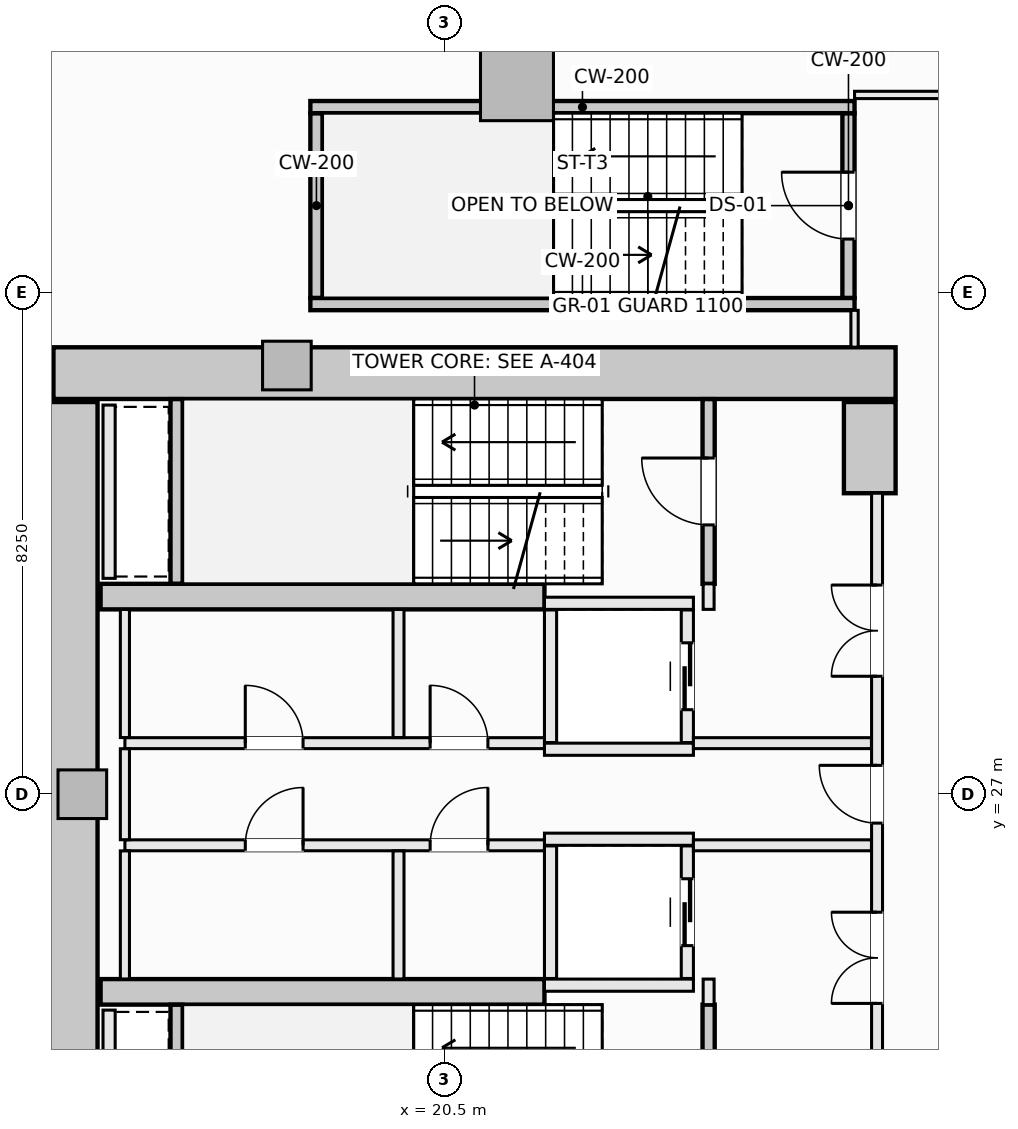
"""IFC4 building model, lengths in metres.
Left out: names, types, materials, properties, quantities, classifications, styles, units other than length and angle.
Written with IfcOpenShell. Run it as: python <this file> out.ifc"""

import sys

from ifc_helpers import new_model, si_unit, direction, frame, frame_2d, origin, origin_2d, place, context, subcontext, project, spatial, rectangle, extrude, element, fill, save


model = new_model("IFC4")
c1 = context("Model", 3, precision=1e-05, world=origin(), true_north=direction((0.0, 1.0)))
c2 = subcontext(c1, "Body", "Model", "MODEL_VIEW")
j1 = project(units=[si_unit("LENGTHUNIT", "METRE"), si_unit("PLANEANGLEUNIT", "RADIAN")], contexts=[c1])
p1 = place(None, origin())
s1 = spatial("IfcSite", under=j1, at=p1, CompositionType="ELEMENT")
p2 = place(p1, origin())
s2 = spatial("IfcBuilding", under=s1, at=p2, CompositionType="ELEMENT")
p3 = place(p2, frame((0.0, 0.0, 45.75)))
s3 = spatial("IfcBuildingStorey", under=s2, at=p3, CompositionType="ELEMENT", Elevation=45.75)
p4 = place(p3, frame((14.075, 33.925, -0.28), z_axis=(0.0, 0.0, 1.0), x_axis=(1.0, 0.0, 0.0)))
e1 = element("IfcWall", 1, at=p4, inside=s3, PredefinedType="SHEAR", context=c2, shape_type="SweptSolid", body=[
    extrude(rectangle(XDim=13.85, YDim=0.85, at=frame_2d((6.925, 0.0))), origin(), (0.0, 0.0, 1.0), 3.85),
])
p5 = place(p3, frame((14.375, 20.55, -0.28), z_axis=(0.0, 0.0, 1.0), x_axis=(0.0, 1.0, 0.0)))
e2 = element("IfcWall", 2, at=p5, inside=s3, PredefinedType="SHEAR", context=c2, shape_type="SweptSolid", body=[
    extrude(rectangle(XDim=12.9, YDim=0.85, at=frame_2d((6.45, 0.0))), origin(), (0.0, 0.0, 1.0), 3.85),
])
p6 = place(p3, frame((27.5, 31.95, -0.28), z_axis=(0.0, 0.0, 1.0), x_axis=(0.0, 1.0, 0.0)))
e3 = element("IfcWall", 3, at=p6, inside=s3, PredefinedType="SHEAR", context=c2, shape_type="SweptSolid", body=[
    extrude(rectangle(XDim=1.5, YDim=0.85, at=frame_2d((0.75, 0.0))), origin(), (0.0, 0.0, 1.0), 3.85),
])
for number, where, z_axis, x_axis in (
    (4, (14.85, 30.25, -0.28), (0.0, 0.0, 1.0), (1.0, 0.0, 0.0)),
    (5, (14.85, 23.75, -0.28), (0.0, 0.0, 1.0), (1.0, 0.0, 0.0)),
):
    element("IfcWall", number, at=place(p3, frame(where, z_axis=z_axis, x_axis=x_axis)), inside=s3, PredefinedType="SHEAR", context=c2, shape_type="SweptSolid", body=[
        extrude(rectangle(XDim=7.3, YDim=0.42, at=frame_2d((3.65, 0.0))), origin(), (0.0, 0.0, 1.0), 3.85),
    ])
p7 = place(p3, frame((21.698, 38.677, -0.28), z_axis=(0.0, 0.0, 1.0), x_axis=(1.0, 0.0, 0.0)))
e6 = element("IfcColumn", 6, at=p7, inside=s3, PredefinedType="COLUMN", context=c2, shape_type="SweptSolid", body=[
    extrude(rectangle(XDim=1.2, YDim=1.2, at=origin_2d()), origin(), (0.0, 0.0, 1.0), 3.85),
])
for number, where, z_axis, x_axis in (
    (7, (17.914, 34.05, -0.28), (0.0, 0.0, 1.0), (1.0, 0.0, 0.0)),
    (8, (14.55, 27.0, -0.28), (0.0, 0.0, 1.0), (1.0, 0.0, 0.0)),
):
    element("IfcColumn", number, at=place(p3, frame(where, z_axis=z_axis, x_axis=x_axis)), inside=s3, PredefinedType="PILASTER", context=c2, shape_type="SweptSolid", body=[
        extrude(rectangle(XDim=0.8, YDim=0.8, at=origin_2d()), origin(), (0.0, 0.0, 1.0), 3.85),
    ])
p8 = place(p3, frame((24.85, 30.46, -0.28), z_axis=(0.0, 0.0, 1.0), x_axis=(0.0, 1.0, 0.0)))
e9 = element("IfcWall", 9, at=p8, inside=s3, PredefinedType="SHEAR", context=c2, shape_type="SweptSolid", body=[
    extrude(rectangle(XDim=3.038, YDim=0.2, at=frame_2d((1.519, 0.0))), origin(), (0.0, 0.0, 1.0), 3.85),
])
p9 = place(p8, frame((0.969, 0.0, 0.28)))
e10 = element("IfcOpeningElement", 10, at=p9, cuts=e9, PredefinedType="OPENING", context=c2, shape_type="SweptSolid", body=[
    extrude(rectangle(XDim=1.1, YDim=2.15, at=frame_2d((0.55, 1.075))), frame((0.0, 0.11, 0.0), z_axis=(0.0, -1.0, 0.0), x_axis=(1.0, 0.0, 0.0)), (0.0, 0.0, 1.0), 0.22),
])
p10 = place(p3, frame((16.1, 30.462, -0.28), z_axis=(0.0, 0.0, 1.0), x_axis=(0.0, 1.0, 0.0)))
e11 = element("IfcWall", 11, at=p10, inside=s3, PredefinedType="SHEAR", context=c2, shape_type="SweptSolid", body=[
    extrude(rectangle(XDim=3.036, YDim=0.2, at=frame_2d((1.518, 0.0))), origin(), (0.0, 0.0, 1.0), 3.85),
])
p11 = place(p3, frame((24.85, 20.502, -0.28), z_axis=(0.0, 0.0, 1.0), x_axis=(0.0, 1.0, 0.0)))
e12 = element("IfcWall", 12, at=p11, inside=s3, PredefinedType="SHEAR", context=c2, shape_type="SweptSolid", body=[
    extrude(rectangle(XDim=3.038, YDim=0.2, at=frame_2d((1.519, 0.0))), origin(), (0.0, 0.0, 1.0), 3.85),
])
p12 = place(p11, frame((0.969, 0.0, 0.28)))
e13 = element("IfcOpeningElement", 13, at=p12, cuts=e12, PredefinedType="OPENING", context=c2, shape_type="SweptSolid", body=[
    extrude(rectangle(XDim=1.1, YDim=2.15, at=frame_2d((0.55, 1.075))), frame((0.0, 0.11, 0.0), z_axis=(0.0, -1.0, 0.0), x_axis=(1.0, 0.0, 0.0)), (0.0, 0.0, 1.0), 0.22),
])
p13 = place(p3, frame((16.1, 20.502, -0.28), z_axis=(0.0, 0.0, 1.0), x_axis=(0.0, 1.0, 0.0)))
e14 = element("IfcWall", 14, at=p13, inside=s3, PredefinedType="SHEAR", context=c2, shape_type="SweptSolid", body=[
    extrude(rectangle(XDim=3.036, YDim=0.2, at=frame_2d((1.518, 0.0))), origin(), (0.0, 0.0, 1.0), 3.85),
])
p14 = place(p3, frame((27.15, 35.16, -0.28), z_axis=(0.0, 0.0, 1.0), x_axis=(0.0, 1.0, 0.0)))
e15 = element("IfcWall", 15, at=p14, inside=s3, PredefinedType="SHEAR", context=c2, shape_type="SweptSolid", body=[
    extrude(rectangle(XDim=3.04, YDim=0.2, at=frame_2d((1.52, 0.0))), origin(), (0.0, 0.0, 1.0), 3.85),
])
p15 = place(p14, frame((0.97, 0.0, 0.28)))
e16 = element("IfcOpeningElement", 16, at=p15, cuts=e15, PredefinedType="OPENING", context=c2, shape_type="SweptSolid", body=[
    extrude(rectangle(XDim=1.1, YDim=2.15, at=frame_2d((0.55, 1.075))), frame((0.0, 0.11, 0.0), z_axis=(0.0, -1.0, 0.0), x_axis=(1.0, 0.0, 0.0)), (0.0, 0.0, 1.0), 0.22),
])
p16 = place(p3, frame((18.4, 35.16, -0.28), z_axis=(0.0, 0.0, 1.0), x_axis=(0.0, 1.0, 0.0)))
e17 = element("IfcWall", 17, at=p16, inside=s3, PredefinedType="SHEAR", context=c2, shape_type="SweptSolid", body=[
    extrude(rectangle(XDim=3.04, YDim=0.2, at=frame_2d((1.52, 0.0))), origin(), (0.0, 0.0, 1.0), 3.85),
])
for number, where, z_axis, x_axis in (
    (18, (18.3, 38.3, -0.28), (0.0, 0.0, 1.0), (1.0, 0.0, 0.0)),
    (19, (18.3, 35.06, -0.28), (0.0, 0.0, 1.0), (1.0, 0.0, 0.0)),
):
    element("IfcWall", number, at=place(p3, frame(where, z_axis=z_axis, x_axis=x_axis)), inside=s3, PredefinedType="SHEAR", context=c2, shape_type="SweptSolid", body=[
        extrude(rectangle(XDim=8.95, YDim=0.2, at=frame_2d((4.475, 0.0))), origin(), (0.0, 0.0, 1.0), 3.85),
    ])
for number, where, z_axis, x_axis in (
    (20, (22.15, 30.14, 0.0), (0.0, 0.0, 1.0), (1.0, 0.0, 0.0)),
    (21, (22.15, 27.74, 0.0), (0.0, 0.0, 1.0), (1.0, 0.0, 0.0)),
):
    element("IfcWall", number, at=place(p3, frame(where, z_axis=z_axis, x_axis=x_axis)), inside=s3, PredefinedType="SOLIDWALL", context=c2, shape_type="SweptSolid", body=[
        extrude(rectangle(XDim=2.45, YDim=0.2, at=frame_2d((1.225, 0.0))), origin(), (0.0, 0.0, 1.0), 3.57),
    ])
p17 = place(p3, frame((22.25, 27.85, 0.0), z_axis=(0.0, 0.0, 1.0), x_axis=(0.0, 1.0, 0.0)))
e22 = element("IfcWall", 22, at=p17, inside=s3, PredefinedType="SOLIDWALL", context=c2, shape_type="SweptSolid", body=[
    extrude(rectangle(XDim=2.18, YDim=0.2, at=frame_2d((1.09, 0.0))), origin(), (0.0, 0.0, 1.0), 3.57),
])
p18 = place(p3, frame((24.5, 27.85, 0.0), z_axis=(0.0, 0.0, 1.0), x_axis=(0.0, 1.0, 0.0)))
e23 = element("IfcWall", 23, at=p18, inside=s3, PredefinedType="SOLIDWALL", context=c2, shape_type="SweptSolid", body=[
    extrude(rectangle(XDim=2.18, YDim=0.2, at=frame_2d((1.09, 0.0))), origin(), (0.0, 0.0, 1.0), 3.57),
])
p19 = place(p18, frame((0.54, 0.0, 0.0)))
e24 = element("IfcOpeningElement", 24, at=p19, cuts=e23, PredefinedType="OPENING", context=c2, shape_type="SweptSolid", body=[
    extrude(rectangle(XDim=1.1, YDim=2.2, at=frame_2d((0.55, 1.1))), frame((0.0, 0.11, 0.0), z_axis=(0.0, -1.0, 0.0), x_axis=(1.0, 0.0, 0.0)), (0.0, 0.0, 1.0), 0.22),
])
for number, where, z_axis, x_axis in (
    (25, (22.15, 26.26, 0.0), (0.0, 0.0, 1.0), (1.0, 0.0, 0.0)),
    (26, (22.15, 23.86, 0.0), (0.0, 0.0, 1.0), (1.0, 0.0, 0.0)),
):
    element("IfcWall", number, at=place(p3, frame(where, z_axis=z_axis, x_axis=x_axis)), inside=s3, PredefinedType="SOLIDWALL", context=c2, shape_type="SweptSolid", body=[
        extrude(rectangle(XDim=2.45, YDim=0.2, at=frame_2d((1.225, 0.0))), origin(), (0.0, 0.0, 1.0), 3.57),
    ])
p20 = place(p3, frame((22.25, 23.97, 0.0), z_axis=(0.0, 0.0, 1.0), x_axis=(0.0, 1.0, 0.0)))
e27 = element("IfcWall", 27, at=p20, inside=s3, PredefinedType="SOLIDWALL", context=c2, shape_type="SweptSolid", body=[
    extrude(rectangle(XDim=2.18, YDim=0.2, at=frame_2d((1.09, 0.0))), origin(), (0.0, 0.0, 1.0), 3.57),
])
p21 = place(p3, frame((24.5, 23.97, 0.0), z_axis=(0.0, 0.0, 1.0), x_axis=(0.0, 1.0, 0.0)))
e28 = element("IfcWall", 28, at=p21, inside=s3, PredefinedType="SOLIDWALL", context=c2, shape_type="SweptSolid", body=[
    extrude(rectangle(XDim=2.18, YDim=0.2, at=frame_2d((1.09, 0.0))), origin(), (0.0, 0.0, 1.0), 3.57),
])
p22 = place(p21, frame((0.54, 0.0, 0.0)))
e29 = element("IfcOpeningElement", 29, at=p22, cuts=e28, PredefinedType="OPENING", context=c2, shape_type="SweptSolid", body=[
    extrude(rectangle(XDim=1.1, YDim=2.2, at=frame_2d((0.55, 1.1))), frame((0.0, 0.11, 0.0), z_axis=(0.0, -1.0, 0.0), x_axis=(1.0, 0.0, 0.0)), (0.0, 0.0, 1.0), 0.22),
])
for number, where, z_axis, x_axis in (
    (30, (14.99, 30.55, 0.0), (0.0, 0.0, 1.0), (0.0, 1.0, 0.0)),
    (31, (14.99, 20.6, 0.0), (0.0, 0.0, 1.0), (0.0, 1.0, 0.0)),
):
    element("IfcWall", number, at=place(p3, frame(where, z_axis=z_axis, x_axis=x_axis)), inside=s3, PredefinedType="SOLIDWALL", context=c2, shape_type="SweptSolid", body=[
        extrude(rectangle(XDim=2.85, YDim=0.2, at=frame_2d((1.425, 0.0))), origin(), (0.0, 0.0, 1.0), 3.57),
    ])
for number, where, z_axis, x_axis in (
    (32, (24.85, 23.54, 0.0), (0.0, 0.0, 1.0), (0.0, 1.0, 0.0)),
    (33, (24.85, 30.04, 0.0), (0.0, 0.0, 1.0), (0.0, 1.0, 0.0)),
):
    element("IfcWall", number, at=place(p3, frame(where, z_axis=z_axis, x_axis=x_axis)), inside=s3, PredefinedType="SOLIDWALL", context=c2, shape_type="SweptSolid", body=[
        extrude(rectangle(XDim=0.42, YDim=0.18, at=frame_2d((0.21, 0.0))), origin(), (0.0, 0.0, 1.0), 3.57),
    ])
p23 = place(p3, frame((27.62, 22.05, 0.0), z_axis=(0.0, 0.0, 1.0), x_axis=(0.0, 1.0, 0.0)))
e34 = element("IfcWall", 34, at=p23, inside=s3, PredefinedType="SOLIDWALL", context=c2, shape_type="SweptSolid", body=[
    extrude(rectangle(XDim=9.9, YDim=0.18, at=frame_2d((4.95, 0.0))), origin(), (0.0, 0.0, 1.0), 2.662),
])
p24 = place(p23, frame((4.475, 0.0, 0.0)))
e35 = element("IfcOpeningElement", 35, at=p24, cuts=e34, PredefinedType="OPENING", context=c2, shape_type="SweptSolid", body=[
    extrude(rectangle(XDim=0.95, YDim=2.1, at=frame_2d((0.475, 1.05))), frame((0.0, 0.1, 0.0), z_axis=(0.0, -1.0, 0.0), x_axis=(1.0, 0.0, 0.0)), (0.0, 0.0, 1.0), 0.2),
])
p25 = place(p23, frame((6.89, 0.0, 0.0)))
e36 = element("IfcOpeningElement", 36, at=p25, cuts=e34, PredefinedType="OPENING", context=c2, shape_type="SweptSolid", body=[
    extrude(rectangle(XDim=1.5, YDim=2.2, at=frame_2d((0.75, 1.1))), frame((0.0, 0.1, 0.0), z_axis=(0.0, -1.0, 0.0), x_axis=(1.0, 0.0, 0.0)), (0.0, 0.0, 1.0), 0.2),
])
p26 = place(p23, frame((1.51, 0.0, 0.0)))
e37 = element("IfcOpeningElement", 37, at=p26, cuts=e34, PredefinedType="OPENING", context=c2, shape_type="SweptSolid", body=[
    extrude(rectangle(XDim=1.5, YDim=2.2, at=frame_2d((0.75, 1.1))), frame((0.0, 0.1, 0.0), z_axis=(0.0, -1.0, 0.0), x_axis=(1.0, 0.0, 0.0)), (0.0, 0.0, 1.0), 0.2),
])
p27 = place(p3, frame((15.25, 27.84, 0.0), z_axis=(0.0, 0.0, 1.0), x_axis=(1.0, 0.0, 0.0)))
e38 = element("IfcWall", 38, at=p27, inside=s3, PredefinedType="SOLIDWALL", context=c2, shape_type="SweptSolid", body=[
    extrude(rectangle(XDim=6.9, YDim=0.18, at=frame_2d((3.45, 0.0))), origin(), (0.0, 0.0, 1.0), 3.57),
])
p28 = place(p27, frame((5.02, 0.0, 0.0)))
e39 = element("IfcOpeningElement", 39, at=p28, cuts=e38, PredefinedType="OPENING", context=c2, shape_type="SweptSolid", body=[
    extrude(rectangle(XDim=0.95, YDim=2.1, at=frame_2d((0.475, 1.05))), frame((0.0, 0.1, 0.0), z_axis=(0.0, -1.0, 0.0), x_axis=(1.0, 0.0, 0.0)), (0.0, 0.0, 1.0), 0.2),
])
p29 = place(p27, frame((1.98, 0.0, 0.0)))
e40 = element("IfcOpeningElement", 40, at=p29, cuts=e38, PredefinedType="OPENING", context=c2, shape_type="SweptSolid", body=[
    extrude(rectangle(XDim=0.95, YDim=2.1, at=frame_2d((0.475, 1.05))), frame((0.0, 0.1, 0.0), z_axis=(0.0, -1.0, 0.0), x_axis=(1.0, 0.0, 0.0)), (0.0, 0.0, 1.0), 0.2),
])
p30 = place(p3, frame((24.6, 27.84, 0.0), z_axis=(0.0, 0.0, 1.0), x_axis=(1.0, 0.0, 0.0)))
e41 = element("IfcWall", 41, at=p30, inside=s3, PredefinedType="SOLIDWALL", context=c2, shape_type="SweptSolid", body=[
    extrude(rectangle(XDim=2.928, YDim=0.18, at=frame_2d((1.464, 0.0))), origin(), (0.0, 0.0, 1.0), 3.57),
])
p31 = place(p3, frame((15.25, 26.16, 0.0), z_axis=(0.0, 0.0, 1.0), x_axis=(1.0, 0.0, 0.0)))
e42 = element("IfcWall", 42, at=p31, inside=s3, PredefinedType="SOLIDWALL", context=c2, shape_type="SweptSolid", body=[
    extrude(rectangle(XDim=6.9, YDim=0.18, at=frame_2d((3.45, 0.0))), origin(), (0.0, 0.0, 1.0), 3.57),
])
p32 = place(p31, frame((5.02, 0.0, 0.0)))
e43 = element("IfcOpeningElement", 43, at=p32, cuts=e42, PredefinedType="OPENING", context=c2, shape_type="SweptSolid", body=[
    extrude(rectangle(XDim=0.95, YDim=2.1, at=frame_2d((0.475, 1.05))), frame((0.0, 0.1, 0.0), z_axis=(0.0, -1.0, 0.0), x_axis=(1.0, 0.0, 0.0)), (0.0, 0.0, 1.0), 0.2),
])
p33 = place(p31, frame((1.98, 0.0, 0.0)))
e44 = element("IfcOpeningElement", 44, at=p33, cuts=e42, PredefinedType="OPENING", context=c2, shape_type="SweptSolid", body=[
    extrude(rectangle(XDim=0.95, YDim=2.1, at=frame_2d((0.475, 1.05))), frame((0.0, 0.1, 0.0), z_axis=(0.0, -1.0, 0.0), x_axis=(1.0, 0.0, 0.0)), (0.0, 0.0, 1.0), 0.2),
])
p34 = place(p3, frame((24.6, 26.16, 0.0), z_axis=(0.0, 0.0, 1.0), x_axis=(1.0, 0.0, 0.0)))
e45 = element("IfcWall", 45, at=p34, inside=s3, PredefinedType="SOLIDWALL", context=c2, shape_type="SweptSolid", body=[
    extrude(rectangle(XDim=2.928, YDim=0.18, at=frame_2d((1.464, 0.0))), origin(), (0.0, 0.0, 1.0), 3.57),
])
p35 = place(p3, frame((15.25, 23.962, 0.0), z_axis=(0.0, 0.0, 1.0), x_axis=(0.0, 1.0, 0.0)))
e46 = element("IfcWall", 46, at=p35, inside=s3, PredefinedType="PARTITIONING", context=c2, shape_type="SweptSolid", body=[
    extrude(rectangle(XDim=2.106, YDim=0.15, at=frame_2d((1.053, 0.0))), origin(), (0.0, 0.0, 1.0), 3.57),
])
p36 = place(p3, frame((15.25, 26.252, 0.0), z_axis=(0.0, 0.0, 1.0), x_axis=(0.0, 1.0, 0.0)))
e47 = element("IfcWall", 47, at=p36, inside=s3, PredefinedType="PARTITIONING", context=c2, shape_type="SweptSolid", body=[
    extrude(rectangle(XDim=1.496, YDim=0.15, at=frame_2d((0.748, 0.0))), origin(), (0.0, 0.0, 1.0), 3.57),
])
p37 = place(p3, frame((15.25, 27.932, 0.0), z_axis=(0.0, 0.0, 1.0), x_axis=(0.0, 1.0, 0.0)))
e48 = element("IfcWall", 48, at=p37, inside=s3, PredefinedType="PARTITIONING", context=c2, shape_type="SweptSolid", body=[
    extrude(rectangle(XDim=2.106, YDim=0.15, at=frame_2d((1.053, 0.0))), origin(), (0.0, 0.0, 1.0), 3.57),
])
for number, where, z_axis, x_axis in (
    (49, (19.75, 23.962, 0.0), (0.0, 0.0, 1.0), (0.0, 1.0, 0.0)),
    (50, (19.75, 27.932, 0.0), (0.0, 0.0, 1.0), (0.0, 1.0, 0.0)),
):
    element("IfcWall", number, at=place(p3, frame(where, z_axis=z_axis, x_axis=x_axis)), inside=s3, PredefinedType="SOLIDWALL", context=c2, shape_type="SweptSolid", body=[
        extrude(rectangle(XDim=2.106, YDim=0.18, at=frame_2d((1.053, 0.0))), origin(), (0.0, 0.0, 1.0), 3.57),
    ])
p38 = place(p3, frame((27.25, 34.352, 0.0), z_axis=(0.0, 0.0, 1.0), x_axis=(0.0, 1.0, 0.0)))
e51 = element("IfcWall", 51, at=p38, inside=s3, PredefinedType="PARTITIONING", context=c2, shape_type="SweptSolid", body=[
    extrude(rectangle(XDim=0.606, YDim=0.12, at=frame_2d((0.303, 0.0))), origin(), (0.0, 0.0, 1.0), 3.57),
])
p39 = place(p3, frame((27.25, 38.5, 0.0), z_axis=(0.0, 0.0, 1.0), x_axis=(1.0, 0.0, 0.0)))
e52 = element("IfcWall", 52, at=p39, inside=s3, PredefinedType="PARTITIONING", context=c2, shape_type="SweptSolid", body=[
    extrude(rectangle(XDim=2.53, YDim=0.12, at=frame_2d((1.265, 0.0))), origin(), (0.0, 0.0, 1.0), 3.57),
])
p40 = place(p9, origin())
e53 = element("IfcDoor", 53, at=p40, inside=s3, OperationType="SINGLE_SWING_RIGHT", PredefinedType="DOOR", context=c2, shape_type="SweptSolid", body=[
    extrude(rectangle(XDim=1.1, YDim=2.15, at=frame_2d((0.55, 1.075))), frame((0.0, 0.025, 0.0), z_axis=(0.0, -1.0, 0.0), x_axis=(1.0, 0.0, 0.0)), (0.0, 0.0, 1.0), 0.05),
])
fill(e10, e53)
p41 = place(p15, origin())
e54 = element("IfcDoor", 54, at=p41, inside=s3, OperationType="SINGLE_SWING_RIGHT", PredefinedType="DOOR", context=c2, shape_type="SweptSolid", body=[
    extrude(rectangle(XDim=1.1, YDim=2.15, at=frame_2d((0.55, 1.075))), frame((0.0, 0.025, 0.0), z_axis=(0.0, -1.0, 0.0), x_axis=(1.0, 0.0, 0.0)), (0.0, 0.0, 1.0), 0.05),
])
fill(e16, e54)
p42 = place(p19, origin())
e55 = element("IfcDoor", 55, at=p42, inside=s3, OperationType="SLIDING_TO_LEFT", PredefinedType="DOOR", context=c2, shape_type="SweptSolid", body=[
    extrude(rectangle(XDim=1.1, YDim=2.2, at=frame_2d((0.55, 1.1))), frame((0.0, 0.025, 0.0), z_axis=(0.0, -1.0, 0.0), x_axis=(1.0, 0.0, 0.0)), (0.0, 0.0, 1.0), 0.05),
])
fill(e24, e55)
p43 = place(p22, origin())
e56 = element("IfcDoor", 56, at=p43, inside=s3, OperationType="SLIDING_TO_LEFT", PredefinedType="DOOR", context=c2, shape_type="SweptSolid", body=[
    extrude(rectangle(XDim=1.1, YDim=2.2, at=frame_2d((0.55, 1.1))), frame((0.0, 0.025, 0.0), z_axis=(0.0, -1.0, 0.0), x_axis=(1.0, 0.0, 0.0)), (0.0, 0.0, 1.0), 0.05),
])
fill(e29, e56)
p44 = place(p24, origin())
e57 = element("IfcDoor", 57, at=p44, inside=s3, OperationType="SINGLE_SWING_RIGHT", PredefinedType="DOOR", context=c2, shape_type="SweptSolid", body=[
    extrude(rectangle(XDim=0.95, YDim=2.1, at=frame_2d((0.475, 1.05))), frame((0.0, 0.025, 0.0), z_axis=(0.0, -1.0, 0.0), x_axis=(1.0, 0.0, 0.0)), (0.0, 0.0, 1.0), 0.05),
])
fill(e35, e57)
p45 = place(p25, origin())
e58 = element("IfcDoor", 58, at=p45, inside=s3, OperationType="DOUBLE_DOOR_SINGLE_SWING", PredefinedType="DOOR", context=c2, shape_type="SweptSolid", body=[
    extrude(rectangle(XDim=1.5, YDim=2.2, at=frame_2d((0.75, 1.1))), frame((0.0, 0.025, 0.0), z_axis=(0.0, -1.0, 0.0), x_axis=(1.0, 0.0, 0.0)), (0.0, 0.0, 1.0), 0.05),
])
fill(e36, e58)
p46 = place(p26, origin())
e59 = element("IfcDoor", 59, at=p46, inside=s3, OperationType="DOUBLE_DOOR_SINGLE_SWING", PredefinedType="DOOR", context=c2, shape_type="SweptSolid", body=[
    extrude(rectangle(XDim=1.5, YDim=2.2, at=frame_2d((0.75, 1.1))), frame((0.0, 0.025, 0.0), z_axis=(0.0, -1.0, 0.0), x_axis=(1.0, 0.0, 0.0)), (0.0, 0.0, 1.0), 0.05),
])
fill(e37, e59)
p47 = place(p28, origin())
e60 = element("IfcDoor", 60, at=p47, inside=s3, OperationType="SINGLE_SWING_LEFT", PredefinedType="DOOR", context=c2, shape_type="SweptSolid", body=[
    extrude(rectangle(XDim=0.95, YDim=2.1, at=frame_2d((0.475, 1.05))), frame((0.0, 0.025, 0.0), z_axis=(0.0, -1.0, 0.0), x_axis=(1.0, 0.0, 0.0)), (0.0, 0.0, 1.0), 0.05),
])
fill(e39, e60)
p48 = place(p32, origin())
e61 = element("IfcDoor", 61, at=p48, inside=s3, OperationType="SINGLE_SWING_RIGHT", PredefinedType="DOOR", context=c2, shape_type="SweptSolid", body=[
    extrude(rectangle(XDim=0.95, YDim=2.1, at=frame_2d((0.475, 1.05))), frame((0.0, 0.025, 0.0), z_axis=(0.0, -1.0, 0.0), x_axis=(1.0, 0.0, 0.0)), (0.0, 0.0, 1.0), 0.05),
])
fill(e43, e61)
p49 = place(p29, origin())
e62 = element("IfcDoor", 62, at=p49, inside=s3, OperationType="SINGLE_SWING_LEFT", PredefinedType="DOOR", context=c2, shape_type="SweptSolid", body=[
    extrude(rectangle(XDim=0.95, YDim=2.1, at=frame_2d((0.475, 1.05))), frame((0.0, 0.025, 0.0), z_axis=(0.0, -1.0, 0.0), x_axis=(1.0, 0.0, 0.0)), (0.0, 0.0, 1.0), 0.05),
])
fill(e40, e62)
p50 = place(p33, origin())
e63 = element("IfcDoor", 63, at=p50, inside=s3, OperationType="SINGLE_SWING_RIGHT", PredefinedType="DOOR", context=c2, shape_type="SweptSolid", body=[
    extrude(rectangle(XDim=0.95, YDim=2.1, at=frame_2d((0.475, 1.05))), frame((0.0, 0.025, 0.0), z_axis=(0.0, -1.0, 0.0), x_axis=(1.0, 0.0, 0.0)), (0.0, 0.0, 1.0), 0.05),
])
fill(e44, e63)
save(model, sys.argv[1])
